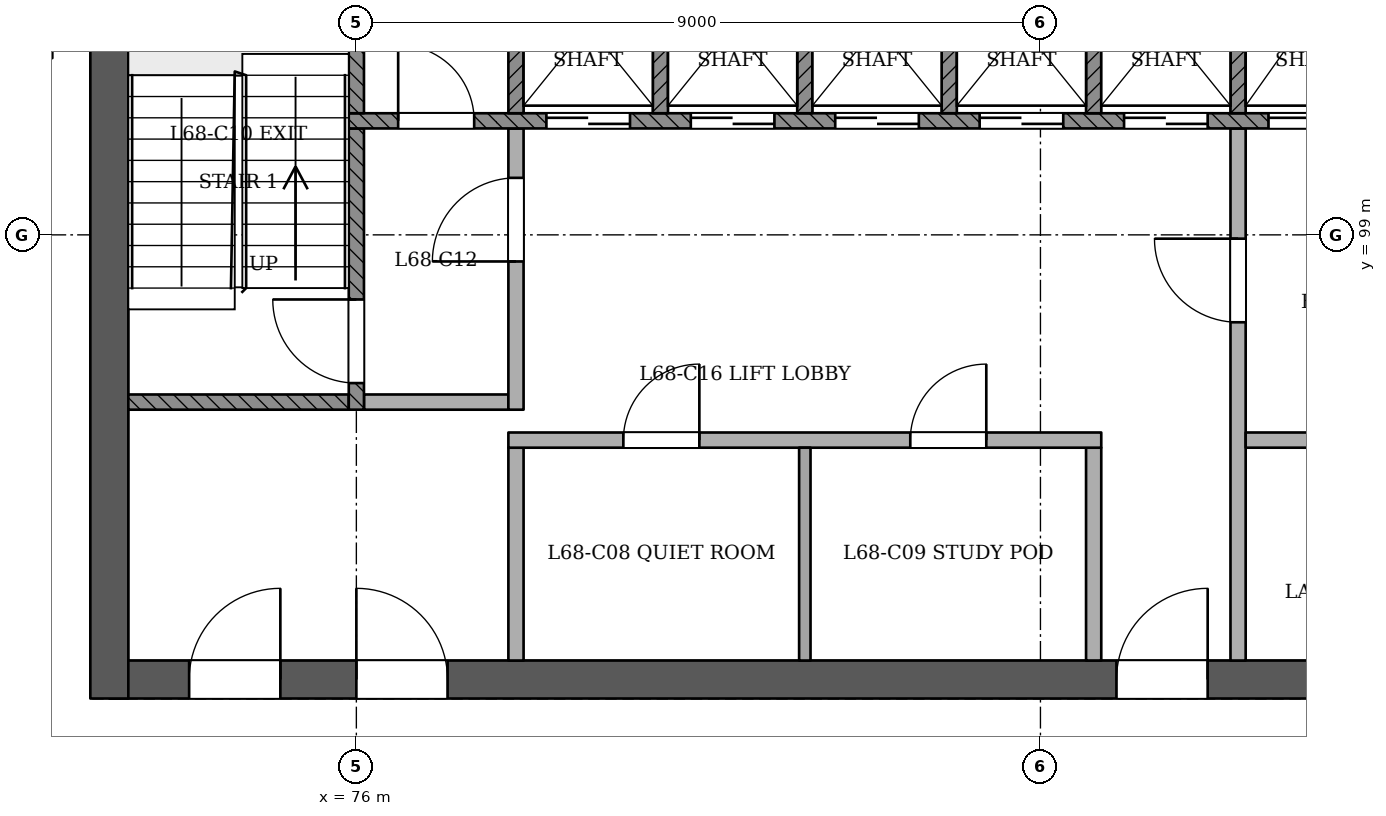
"""IFC4 building model, lengths in metres.
Left out: names, types, materials, properties, quantities, classifications, styles, units other than length and angle.
Written with IfcOpenShell. Run it as: python <this file> out.ifc"""

import sys

from ifc_helpers import new_model, si_unit, direction, frame, frame_2d, origin, place, context, subcontext, project, spatial, rectangle, extrude, element, fill, save


model = new_model("IFC4")
c1 = context("Model", 3, precision=1e-05, world=origin(), true_north=direction((0.0, 1.0)))
c2 = subcontext(c1, "Body", "Model", "MODEL_VIEW")
j1 = project(units=[si_unit("LENGTHUNIT", "METRE"), si_unit("PLANEANGLEUNIT", "RADIAN")], contexts=[c1])
p1 = place(None, origin())
s1 = spatial("IfcSite", under=j1, at=p1, CompositionType="ELEMENT")
p2 = place(p1, origin())
s2 = spatial("IfcBuilding", under=s1, at=p2, CompositionType="ELEMENT")
p3 = place(p2, frame((0.0, 0.0, 264.4)))
s3 = spatial("IfcBuildingStorey", under=s2, at=p3, CompositionType="ELEMENT", Elevation=264.4)
p4 = place(p3, frame((72.75, 93.15, 0.0), z_axis=(0.0, 0.0, 1.0), x_axis=(1.0, 0.0, 0.0)))
e1 = element("IfcWall", 1, at=p4, inside=s3, PredefinedType="SHEAR", context=c2, shape_type="SweptSolid", body=[
    extrude(rectangle(XDim=24.75, YDim=0.5, at=frame_2d((12.375, 0.0))), origin(), (0.0, 0.0, 1.0), 3.6),
])
p5 = place(p4, frame((1.05, 0.0, 0.0)))
e2 = element("IfcOpeningElement", 2, at=p5, cuts=e1, PredefinedType="OPENING", context=c2, shape_type="SweptSolid", body=[
    extrude(rectangle(XDim=1.2, YDim=2.1, at=frame_2d((0.6, 1.05))), frame((0.0, 0.26, 0.0), z_axis=(0.0, -1.0, 0.0), x_axis=(1.0, 0.0, 0.0)), (0.0, 0.0, 1.0), 0.521),
])
p6 = place(p4, frame((3.25, 0.0, 0.0)))
e3 = element("IfcOpeningElement", 3, at=p6, cuts=e1, PredefinedType="OPENING", context=c2, shape_type="SweptSolid", body=[
    extrude(rectangle(XDim=1.2, YDim=2.1, at=frame_2d((0.6, 1.05))), frame((0.0, 0.26, 0.0), z_axis=(0.0, -1.0, 0.0), x_axis=(1.0, 0.0, 0.0)), (0.0, 0.0, 1.0), 0.521),
])
p7 = place(p4, frame((13.25, 0.0, 0.0)))
e4 = element("IfcOpeningElement", 4, at=p7, cuts=e1, PredefinedType="OPENING", context=c2, shape_type="SweptSolid", body=[
    extrude(rectangle(XDim=1.2, YDim=2.1, at=frame_2d((0.6, 1.05))), frame((0.0, 0.26, 0.0), z_axis=(0.0, -1.0, 0.0), x_axis=(1.0, 0.0, 0.0)), (0.0, 0.0, 1.0), 0.521),
])
p8 = place(p4, frame((15.913, 0.0, 0.0)))
e5 = element("IfcOpeningElement", 5, at=p8, cuts=e1, PredefinedType="OPENING", context=c2, shape_type="SweptSolid", body=[
    extrude(rectangle(XDim=1.0, YDim=2.1, at=frame_2d((0.5, 1.05))), frame((0.0, 0.26, 0.0), z_axis=(0.0, -1.0, 0.0), x_axis=(1.0, 0.0, 0.0)), (0.0, 0.0, 1.0), 0.521),
])
p9 = place(p4, frame((18.7, 0.0, 0.0)))
e6 = element("IfcOpeningElement", 6, at=p9, cuts=e1, PredefinedType="OPENING", context=c2, shape_type="SweptSolid", body=[
    extrude(rectangle(XDim=1.0, YDim=2.1, at=frame_2d((0.5, 1.05))), frame((0.0, 0.26, 0.0), z_axis=(0.0, -1.0, 0.0), x_axis=(1.0, 0.0, 0.0)), (0.0, 0.0, 1.0), 0.521),
])
p10 = place(p4, frame((21.887, 0.0, 0.0)))
e7 = element("IfcOpeningElement", 7, at=p10, cuts=e1, PredefinedType="OPENING", context=c2, shape_type="SweptSolid", body=[
    extrude(rectangle(XDim=1.0, YDim=2.1, at=frame_2d((0.5, 1.05))), frame((0.0, 0.26, 0.0), z_axis=(0.0, -1.0, 0.0), x_axis=(1.0, 0.0, 0.0)), (0.0, 0.0, 1.0), 0.521),
])
p11 = place(p3, frame((72.75, 103.65, 0.0), z_axis=(0.0, 0.0, 1.0), x_axis=(0.0, -1.0, 0.0)))
e8 = element("IfcWall", 8, at=p11, inside=s3, PredefinedType="SHEAR", context=c2, shape_type="SweptSolid", body=[
    extrude(rectangle(XDim=10.75, YDim=0.5, at=frame_2d((5.375, 0.0))), origin(), (0.0, 0.0, 1.0), 3.6),
])
p12 = place(p3, frame((72.0, 101.4, 0.0), z_axis=(0.0, 0.0, 1.0), x_axis=(-1.0, 0.0, 0.0)))
e9 = element("IfcWall", 9, at=p12, inside=s3, PredefinedType="PARTITIONING", context=c2, shape_type="SweptSolid", body=[
    extrude(rectangle(XDim=1.8, YDim=0.15, at=frame_2d((0.9, 0.0))), origin(), (0.0, 0.0, 1.0), 3.2),
])
p13 = place(p12, frame((0.503, 0.0, 0.0)))
e10 = element("IfcOpeningElement", 10, at=p13, cuts=e9, PredefinedType="OPENING", context=c2, shape_type="SweptSolid", body=[
    extrude(rectangle(XDim=1.0, YDim=2.1, at=frame_2d((0.5, 1.05))), frame((0.0, 0.085, 0.0), z_axis=(0.0, -1.0, 0.0), x_axis=(1.0, 0.0, 0.0)), (0.0, 0.0, 1.0), 0.171),
])
p14 = place(p3, frame((78.1, 93.4, 0.0), z_axis=(0.0, 0.0, 1.0), x_axis=(0.0, 1.0, 0.0)))
e11 = element("IfcWall", 11, at=p14, inside=s3, PredefinedType="PARTITIONING", context=c2, shape_type="SweptSolid", body=[
    extrude(rectangle(XDim=2.8, YDim=0.2, at=frame_2d((1.4, 0.0))), origin(), (0.0, 0.0, 1.0), 3.2),
])
p15 = place(p3, frame((81.9, 93.4, 0.0), z_axis=(0.0, 0.0, 1.0), x_axis=(0.0, 1.0, 0.0)))
e12 = element("IfcWall", 12, at=p15, inside=s3, PredefinedType="PARTITIONING", context=c2, shape_type="SweptSolid", body=[
    extrude(rectangle(XDim=2.8, YDim=0.15, at=frame_2d((1.4, 0.0))), origin(), (0.0, 0.0, 1.0), 3.2),
])
p16 = place(p3, frame((85.7, 93.4, 0.0), z_axis=(0.0, 0.0, 1.0), x_axis=(0.0, 1.0, 0.0)))
e13 = element("IfcWall", 13, at=p16, inside=s3, PredefinedType="PARTITIONING", context=c2, shape_type="SweptSolid", body=[
    extrude(rectangle(XDim=2.8, YDim=0.2, at=frame_2d((1.4, 0.0))), origin(), (0.0, 0.0, 1.0), 3.2),
])
p17 = place(p3, frame((87.6, 93.4, 0.0), z_axis=(0.0, 0.0, 1.0), x_axis=(0.0, 1.0, 0.0)))
e14 = element("IfcWall", 14, at=p17, inside=s3, PredefinedType="PARTITIONING", context=c2, shape_type="SweptSolid", body=[
    extrude(rectangle(XDim=7.0, YDim=0.2, at=frame_2d((3.5, 0.0))), origin(), (0.0, 0.0, 1.0), 3.2),
])
p18 = place(p17, frame((4.45, 0.0, 0.0)))
e15 = element("IfcOpeningElement", 15, at=p18, cuts=e14, PredefinedType="OPENING", context=c2, shape_type="SweptSolid", body=[
    extrude(rectangle(XDim=1.1, YDim=2.1, at=frame_2d((0.55, 1.05))), frame((0.0, 0.11, 0.0), z_axis=(0.0, -1.0, 0.0), x_axis=(1.0, 0.0, 0.0)), (0.0, 0.0, 1.0), 0.221),
])
p19 = place(p3, frame((78.0, 96.3, 0.0), z_axis=(0.0, 0.0, 1.0), x_axis=(1.0, 0.0, 0.0)))
e16 = element("IfcWall", 16, at=p19, inside=s3, PredefinedType="PARTITIONING", context=c2, shape_type="SweptSolid", body=[
    extrude(rectangle(XDim=7.8, YDim=0.2, at=frame_2d((3.9, 0.0))), origin(), (0.0, 0.0, 1.0), 3.2),
])
p20 = place(p19, frame((1.512, 0.0, 0.0)))
e17 = element("IfcOpeningElement", 17, at=p20, cuts=e16, PredefinedType="OPENING", context=c2, shape_type="SweptSolid", body=[
    extrude(rectangle(XDim=1.0, YDim=2.1, at=frame_2d((0.5, 1.05))), frame((0.0, 0.11, 0.0), z_axis=(0.0, -1.0, 0.0), x_axis=(1.0, 0.0, 0.0)), (0.0, 0.0, 1.0), 0.221),
])
p21 = place(p19, frame((5.288, 0.0, 0.0)))
e18 = element("IfcOpeningElement", 18, at=p21, cuts=e16, PredefinedType="OPENING", context=c2, shape_type="SweptSolid", body=[
    extrude(rectangle(XDim=1.0, YDim=2.1, at=frame_2d((0.5, 1.05))), frame((0.0, 0.11, 0.0), z_axis=(0.0, -1.0, 0.0), x_axis=(1.0, 0.0, 0.0)), (0.0, 0.0, 1.0), 0.221),
])
p22 = place(p3, frame((87.7, 96.3, 0.0), z_axis=(0.0, 0.0, 1.0), x_axis=(1.0, 0.0, 0.0)))
e19 = element("IfcWall", 19, at=p22, inside=s3, PredefinedType="PARTITIONING", context=c2, shape_type="SweptSolid", body=[
    extrude(rectangle(XDim=3.6, YDim=0.2, at=frame_2d((1.8, 0.0))), origin(), (0.0, 0.0, 1.0), 3.2),
])
p23 = place(p3, frame((73.0, 96.8, 0.0), z_axis=(0.0, 0.0, 1.0), x_axis=(1.0, 0.0, 0.0)))
e20 = element("IfcWall", 20, at=p23, inside=s3, PredefinedType="SOLIDWALL", context=c2, shape_type="SweptSolid", body=[
    extrude(rectangle(XDim=2.9, YDim=0.2, at=frame_2d((1.45, 0.0))), origin(), (0.0, 0.0, 1.0), 3.2),
])
p24 = place(p3, frame((76.0, 96.7, 0.0), z_axis=(0.0, 0.0, 1.0), x_axis=(0.0, 1.0, 0.0)))
e21 = element("IfcWall", 21, at=p24, inside=s3, PredefinedType="SOLIDWALL", context=c2, shape_type="SweptSolid", body=[
    extrude(rectangle(XDim=3.7, YDim=0.2, at=frame_2d((1.85, 0.0))), origin(), (0.0, 0.0, 1.0), 3.2),
])
p25 = place(p24, frame((0.35, 0.0, 0.0)))
e22 = element("IfcOpeningElement", 22, at=p25, cuts=e21, PredefinedType="OPENING", context=c2, shape_type="SweptSolid", body=[
    extrude(rectangle(XDim=1.1, YDim=2.1, at=frame_2d((0.55, 1.05))), frame((0.0, 0.11, 0.0), z_axis=(0.0, -1.0, 0.0), x_axis=(1.0, 0.0, 0.0)), (0.0, 0.0, 1.0), 0.221),
])
p26 = place(p3, frame((76.1, 96.8, 0.0), z_axis=(0.0, 0.0, 1.0), x_axis=(1.0, 0.0, 0.0)))
e23 = element("IfcWall", 23, at=p26, inside=s3, PredefinedType="PARTITIONING", context=c2, shape_type="SweptSolid", body=[
    extrude(rectangle(XDim=1.9, YDim=0.2, at=frame_2d((0.95, 0.0))), origin(), (0.0, 0.0, 1.0), 3.2),
])
p27 = place(p3, frame((78.1, 96.7, 0.0), z_axis=(0.0, 0.0, 1.0), x_axis=(0.0, 1.0, 0.0)))
e24 = element("IfcWall", 24, at=p27, inside=s3, PredefinedType="PARTITIONING", context=c2, shape_type="SweptSolid", body=[
    extrude(rectangle(XDim=3.7, YDim=0.2, at=frame_2d((1.85, 0.0))), origin(), (0.0, 0.0, 1.0), 3.2),
])
p28 = place(p27, frame((1.95, 0.0, 0.0)))
e25 = element("IfcOpeningElement", 25, at=p28, cuts=e24, PredefinedType="OPENING", context=c2, shape_type="SweptSolid", body=[
    extrude(rectangle(XDim=1.1, YDim=2.1, at=frame_2d((0.55, 1.05))), frame((0.0, 0.11, 0.0), z_axis=(0.0, -1.0, 0.0), x_axis=(1.0, 0.0, 0.0)), (0.0, 0.0, 1.0), 0.221),
])
p29 = place(p3, frame((75.9, 100.5, 0.0), z_axis=(0.0, 0.0, 1.0), x_axis=(1.0, 0.0, 0.0)))
e26 = element("IfcWall", 26, at=p29, inside=s3, PredefinedType="SOLIDWALL", context=c2, shape_type="SweptSolid", body=[
    extrude(rectangle(XDim=18.2, YDim=0.2, at=frame_2d((9.1, 0.0))), origin(), (0.0, 0.0, 1.0), 3.2),
])
p30 = place(p29, frame((2.6, 0.0, 0.0)))
e27 = element("IfcOpeningElement", 27, at=p30, cuts=e26, PredefinedType="OPENING", context=c2, shape_type="SweptSolid", body=[
    extrude(rectangle(XDim=1.1, YDim=2.1, at=frame_2d((0.55, 1.05))), frame((0.0, 0.11, 0.0), z_axis=(0.0, -1.0, 0.0), x_axis=(1.0, 0.0, 0.0)), (0.0, 0.0, 1.0), 0.221),
])
p31 = place(p29, frame((4.5, 0.0, 0.0)))
e28 = element("IfcOpeningElement", 28, at=p31, cuts=e26, PredefinedType="OPENING", context=c2, shape_type="SweptSolid", body=[
    extrude(rectangle(XDim=1.1, YDim=2.1, at=frame_2d((0.55, 1.05))), frame((0.0, 0.11, 0.0), z_axis=(0.0, -1.0, 0.0), x_axis=(1.0, 0.0, 0.0)), (0.0, 0.0, 1.0), 0.221),
])
p32 = place(p29, frame((6.4, 0.0, 0.0)))
e29 = element("IfcOpeningElement", 29, at=p32, cuts=e26, PredefinedType="OPENING", context=c2, shape_type="SweptSolid", body=[
    extrude(rectangle(XDim=1.1, YDim=2.1, at=frame_2d((0.55, 1.05))), frame((0.0, 0.11, 0.0), z_axis=(0.0, -1.0, 0.0), x_axis=(1.0, 0.0, 0.0)), (0.0, 0.0, 1.0), 0.221),
])
p33 = place(p29, frame((8.3, 0.0, 0.0)))
e30 = element("IfcOpeningElement", 30, at=p33, cuts=e26, PredefinedType="OPENING", context=c2, shape_type="SweptSolid", body=[
    extrude(rectangle(XDim=1.1, YDim=2.1, at=frame_2d((0.55, 1.05))), frame((0.0, 0.11, 0.0), z_axis=(0.0, -1.0, 0.0), x_axis=(1.0, 0.0, 0.0)), (0.0, 0.0, 1.0), 0.221),
])
p34 = place(p29, frame((10.2, 0.0, 0.0)))
e31 = element("IfcOpeningElement", 31, at=p34, cuts=e26, PredefinedType="OPENING", context=c2, shape_type="SweptSolid", body=[
    extrude(rectangle(XDim=1.1, YDim=2.1, at=frame_2d((0.55, 1.05))), frame((0.0, 0.11, 0.0), z_axis=(0.0, -1.0, 0.0), x_axis=(1.0, 0.0, 0.0)), (0.0, 0.0, 1.0), 0.221),
])
p35 = place(p29, frame((12.1, 0.0, 0.0)))
e32 = element("IfcOpeningElement", 32, at=p35, cuts=e26, PredefinedType="OPENING", context=c2, shape_type="SweptSolid", body=[
    extrude(rectangle(XDim=1.1, YDim=2.1, at=frame_2d((0.55, 1.05))), frame((0.0, 0.11, 0.0), z_axis=(0.0, -1.0, 0.0), x_axis=(1.0, 0.0, 0.0)), (0.0, 0.0, 1.0), 0.221),
])
p36 = place(p29, frame((14.0, 0.0, 0.0)))
e33 = element("IfcOpeningElement", 33, at=p36, cuts=e26, PredefinedType="OPENING", context=c2, shape_type="SweptSolid", body=[
    extrude(rectangle(XDim=1.1, YDim=2.1, at=frame_2d((0.55, 1.05))), frame((0.0, 0.11, 0.0), z_axis=(0.0, -1.0, 0.0), x_axis=(1.0, 0.0, 0.0)), (0.0, 0.0, 1.0), 0.221),
])
p37 = place(p29, frame((0.65, 0.0, 0.0)))
e34 = element("IfcOpeningElement", 34, at=p37, cuts=e26, PredefinedType="OPENING", context=c2, shape_type="SweptSolid", body=[
    extrude(rectangle(XDim=1.0, YDim=2.1, at=frame_2d((0.5, 1.05))), frame((0.0, 0.11, 0.0), z_axis=(0.0, -1.0, 0.0), x_axis=(1.0, 0.0, 0.0)), (0.0, 0.0, 1.0), 0.221),
])
p38 = place(p29, frame((16.3, 0.0, 0.0)))
e35 = element("IfcOpeningElement", 35, at=p38, cuts=e26, PredefinedType="OPENING", context=c2, shape_type="SweptSolid", body=[
    extrude(rectangle(XDim=1.0, YDim=2.1, at=frame_2d((0.5, 1.05))), frame((0.0, 0.11, 0.0), z_axis=(0.0, -1.0, 0.0), x_axis=(1.0, 0.0, 0.0)), (0.0, 0.0, 1.0), 0.221),
])
for number, where, z_axis, x_axis in (
    (36, (76.0, 100.6, 0.0), (0.0, 0.0, 1.0), (0.0, 1.0, 0.0)),
    (37, (78.1, 100.6, 0.0), (0.0, 0.0, 1.0), (0.0, 1.0, 0.0)),
    (38, (80.0, 100.6, 0.0), (0.0, 0.0, 1.0), (0.0, 1.0, 0.0)),
    (39, (81.9, 100.6, 0.0), (0.0, 0.0, 1.0), (0.0, 1.0, 0.0)),
    (40, (83.8, 100.6, 0.0), (0.0, 0.0, 1.0), (0.0, 1.0, 0.0)),
    (41, (85.7, 100.6, 0.0), (0.0, 0.0, 1.0), (0.0, 1.0, 0.0)),
    (42, (87.6, 100.6, 0.0), (0.0, 0.0, 1.0), (0.0, 1.0, 0.0)),
):
    element("IfcWall", number, at=place(p3, frame(where, z_axis=z_axis, x_axis=x_axis)), inside=s3, PredefinedType="SOLIDWALL", context=c2, shape_type="SweptSolid", body=[
        extrude(rectangle(XDim=2.8, YDim=0.2, at=frame_2d((1.4, 0.0))), origin(), (0.0, 0.0, 1.0), 3.2),
    ])
p39 = place(p30, origin())
e43 = element("IfcDoor", 43, at=p39, inside=s3, OperationType="SLIDING_TO_RIGHT", PredefinedType="NOTDEFINED", context=c2, shape_type="SweptSolid", body=[
    extrude(rectangle(XDim=1.1, YDim=2.1, at=frame_2d((0.55, 1.05))), frame((0.0, 0.025, 0.0), z_axis=(0.0, -1.0, 0.0), x_axis=(1.0, 0.0, 0.0)), (0.0, 0.0, 1.0), 0.05),
])
fill(e27, e43)
p40 = place(p31, origin())
e44 = element("IfcDoor", 44, at=p40, inside=s3, OperationType="SLIDING_TO_LEFT", PredefinedType="NOTDEFINED", context=c2, shape_type="SweptSolid", body=[
    extrude(rectangle(XDim=1.1, YDim=2.1, at=frame_2d((0.55, 1.05))), frame((0.0, 0.025, 0.0), z_axis=(0.0, -1.0, 0.0), x_axis=(1.0, 0.0, 0.0)), (0.0, 0.0, 1.0), 0.05),
])
fill(e28, e44)
p41 = place(p32, origin())
e45 = element("IfcDoor", 45, at=p41, inside=s3, OperationType="SLIDING_TO_RIGHT", PredefinedType="NOTDEFINED", context=c2, shape_type="SweptSolid", body=[
    extrude(rectangle(XDim=1.1, YDim=2.1, at=frame_2d((0.55, 1.05))), frame((0.0, 0.025, 0.0), z_axis=(0.0, -1.0, 0.0), x_axis=(1.0, 0.0, 0.0)), (0.0, 0.0, 1.0), 0.05),
])
fill(e29, e45)
p42 = place(p33, origin())
e46 = element("IfcDoor", 46, at=p42, inside=s3, OperationType="SLIDING_TO_LEFT", PredefinedType="NOTDEFINED", context=c2, shape_type="SweptSolid", body=[
    extrude(rectangle(XDim=1.1, YDim=2.1, at=frame_2d((0.55, 1.05))), frame((0.0, 0.025, 0.0), z_axis=(0.0, -1.0, 0.0), x_axis=(1.0, 0.0, 0.0)), (0.0, 0.0, 1.0), 0.05),
])
fill(e30, e46)
p43 = place(p34, origin())
e47 = element("IfcDoor", 47, at=p43, inside=s3, OperationType="SLIDING_TO_RIGHT", PredefinedType="NOTDEFINED", context=c2, shape_type="SweptSolid", body=[
    extrude(rectangle(XDim=1.1, YDim=2.1, at=frame_2d((0.55, 1.05))), frame((0.0, 0.025, 0.0), z_axis=(0.0, -1.0, 0.0), x_axis=(1.0, 0.0, 0.0)), (0.0, 0.0, 1.0), 0.05),
])
fill(e31, e47)
p44 = place(p35, origin())
e48 = element("IfcDoor", 48, at=p44, inside=s3, OperationType="SLIDING_TO_RIGHT", PredefinedType="NOTDEFINED", context=c2, shape_type="SweptSolid", body=[
    extrude(rectangle(XDim=1.1, YDim=2.1, at=frame_2d((0.55, 1.05))), frame((0.0, 0.025, 0.0), z_axis=(0.0, -1.0, 0.0), x_axis=(1.0, 0.0, 0.0)), (0.0, 0.0, 1.0), 0.05),
])
fill(e32, e48)
p45 = place(p25, origin())
e49 = element("IfcDoor", 49, at=p45, inside=s3, OperationType="SINGLE_SWING_RIGHT", PredefinedType="NOTDEFINED", context=c2, shape_type="SweptSolid", body=[
    extrude(rectangle(XDim=1.1, YDim=2.1, at=frame_2d((0.55, 1.05))), frame((0.0, 0.025, 0.0), z_axis=(0.0, -1.0, 0.0), x_axis=(1.0, 0.0, 0.0)), (0.0, 0.0, 1.0), 0.05),
])
fill(e22, e49)
p46 = place(p28, origin())
e50 = element("IfcDoor", 50, at=p46, inside=s3, OperationType="SINGLE_SWING_LEFT", PredefinedType="NOTDEFINED", context=c2, shape_type="SweptSolid", body=[
    extrude(rectangle(XDim=1.1, YDim=2.1, at=frame_2d((0.55, 1.05))), frame((0.0, 0.025, 0.0), z_axis=(0.0, -1.0, 0.0), x_axis=(1.0, 0.0, 0.0)), (0.0, 0.0, 1.0), 0.05),
])
fill(e25, e50)
p47 = place(p18, origin())
e51 = element("IfcDoor", 51, at=p47, inside=s3, OperationType="SINGLE_SWING_RIGHT", PredefinedType="NOTDEFINED", context=c2, shape_type="SweptSolid", body=[
    extrude(rectangle(XDim=1.1, YDim=2.1, at=frame_2d((0.55, 1.05))), frame((0.0, 0.025, 0.0), z_axis=(0.0, -1.0, 0.0), x_axis=(1.0, 0.0, 0.0)), (0.0, 0.0, 1.0), 0.05),
])
fill(e15, e51)
p48 = place(p5, origin())
e52 = element("IfcDoor", 52, at=p48, inside=s3, OperationType="SINGLE_SWING_RIGHT", PredefinedType="NOTDEFINED", context=c2, shape_type="SweptSolid", body=[
    extrude(rectangle(XDim=1.2, YDim=2.1, at=frame_2d((0.6, 1.05))), frame((0.0, 0.025, 0.0), z_axis=(0.0, -1.0, 0.0), x_axis=(1.0, 0.0, 0.0)), (0.0, 0.0, 1.0), 0.05),
])
fill(e2, e52)
p49 = place(p6, origin())
e53 = element("IfcDoor", 53, at=p49, inside=s3, OperationType="SINGLE_SWING_LEFT", PredefinedType="NOTDEFINED", context=c2, shape_type="SweptSolid", body=[
    extrude(rectangle(XDim=1.2, YDim=2.1, at=frame_2d((0.6, 1.05))), frame((0.0, 0.025, 0.0), z_axis=(0.0, -1.0, 0.0), x_axis=(1.0, 0.0, 0.0)), (0.0, 0.0, 1.0), 0.05),
])
fill(e3, e53)
p50 = place(p7, origin())
e54 = element("IfcDoor", 54, at=p50, inside=s3, OperationType="SINGLE_SWING_RIGHT", PredefinedType="NOTDEFINED", context=c2, shape_type="SweptSolid", body=[
    extrude(rectangle(XDim=1.2, YDim=2.1, at=frame_2d((0.6, 1.05))), frame((0.0, 0.025, 0.0), z_axis=(0.0, -1.0, 0.0), x_axis=(1.0, 0.0, 0.0)), (0.0, 0.0, 1.0), 0.05),
])
fill(e4, e54)
p51 = place(p37, origin())
e55 = element("IfcDoor", 55, at=p51, inside=s3, OperationType="SINGLE_SWING_LEFT", PredefinedType="NOTDEFINED", context=c2, shape_type="SweptSolid", body=[
    extrude(rectangle(XDim=1.0, YDim=2.1, at=frame_2d((0.5, 1.05))), frame((0.0, 0.025, 0.0), z_axis=(0.0, -1.0, 0.0), x_axis=(1.0, 0.0, 0.0)), (0.0, 0.0, 1.0), 0.05),
])
fill(e34, e55)
p52 = place(p20, origin())
e56 = element("IfcDoor", 56, at=p52, inside=s3, OperationType="SINGLE_SWING_RIGHT", PredefinedType="NOTDEFINED", context=c2, shape_type="SweptSolid", body=[
    extrude(rectangle(XDim=1.0, YDim=2.1, at=frame_2d((0.5, 1.05))), frame((0.0, 0.025, 0.0), z_axis=(0.0, -1.0, 0.0), x_axis=(1.0, 0.0, 0.0)), (0.0, 0.0, 1.0), 0.05),
])
fill(e17, e56)
p53 = place(p21, origin())
e57 = element("IfcDoor", 57, at=p53, inside=s3, OperationType="SINGLE_SWING_RIGHT", PredefinedType="NOTDEFINED", context=c2, shape_type="SweptSolid", body=[
    extrude(rectangle(XDim=1.0, YDim=2.1, at=frame_2d((0.5, 1.05))), frame((0.0, 0.025, 0.0), z_axis=(0.0, -1.0, 0.0), x_axis=(1.0, 0.0, 0.0)), (0.0, 0.0, 1.0), 0.05),
])
fill(e18, e57)
save(model, sys.argv[1])
